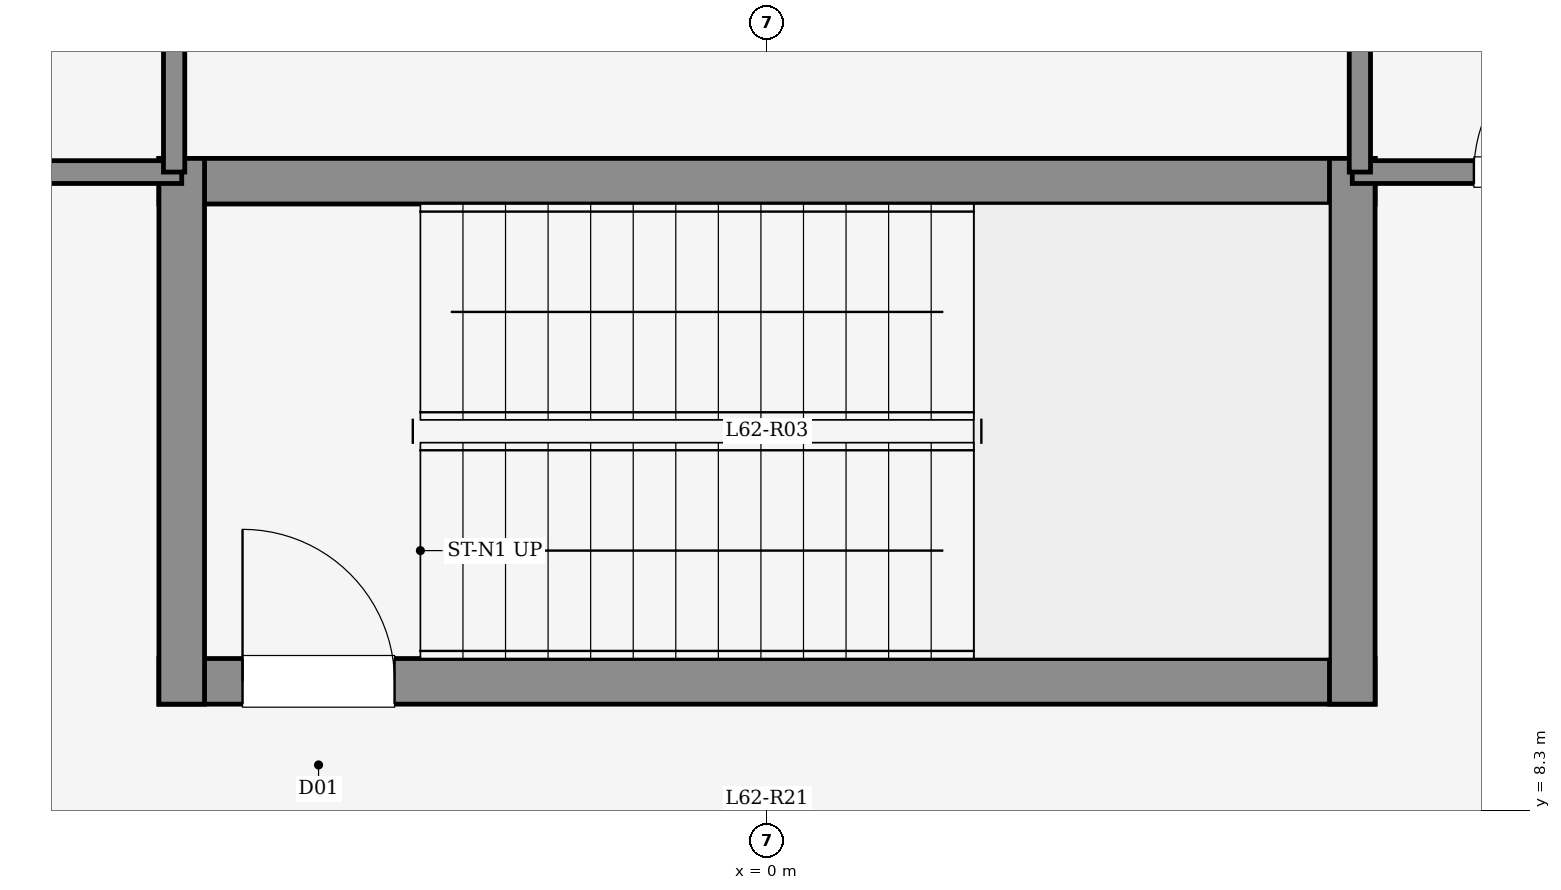
"""IFC4 building model, lengths in metres.
Left out: names, types, materials, properties, quantities, classifications, styles, units other than length and angle.
Written with IfcOpenShell. Run it as: python <this file> out.ifc"""

import sys

from ifc_helpers import new_model, si_unit, direction, frame, frame_2d, origin, place, context, subcontext, project, spatial, rectangle, extrude, element, fill, save


model = new_model("IFC4")
c1 = context("Model", 3, precision=1e-05, world=origin(), true_north=direction((0.0, 1.0)))
c2 = subcontext(c1, "Body", "Model", "MODEL_VIEW")
j1 = project(units=[si_unit("LENGTHUNIT", "METRE"), si_unit("PLANEANGLEUNIT", "RADIAN")], contexts=[c1])
p1 = place(None, origin())
s1 = spatial("IfcSite", under=j1, at=p1, CompositionType="ELEMENT")
p2 = place(p1, origin())
s2 = spatial("IfcBuilding", under=s1, at=p2, CompositionType="ELEMENT")
p3 = place(p2, frame((0.0, 0.0, 227.1)))
s3 = spatial("IfcBuildingStorey", under=s2, at=p3, CompositionType="ELEMENT", Elevation=227.1)
p4 = place(p3, frame((-4.0, 12.44, 0.0), z_axis=(0.0, 0.0, 1.0), x_axis=(1.0, 0.0, 0.0)))
e1 = element("IfcWall", 1, at=p4, inside=s3, PredefinedType="SHEAR", context=c2, shape_type="SweptSolid", body=[
    extrude(rectangle(XDim=8.0, YDim=0.3, at=frame_2d((4.0, 0.0))), origin(), (0.0, 0.0, 1.0), 4.65),
])
p5 = place(p3, frame((-4.0, 9.15, 0.0), z_axis=(0.0, 0.0, 1.0), x_axis=(1.0, 0.0, 0.0)))
e2 = element("IfcWall", 2, at=p5, inside=s3, PredefinedType="SHEAR", context=c2, shape_type="SweptSolid", body=[
    extrude(rectangle(XDim=8.0, YDim=0.3, at=frame_2d((4.0, 0.0))), origin(), (0.0, 0.0, 1.0), 4.65),
])
p6 = place(p5, frame((0.55, 0.0, 0.0)))
e3 = element("IfcOpeningElement", 3, at=p6, cuts=e2, PredefinedType="OPENING", context=c2, shape_type="SweptSolid", body=[
    extrude(rectangle(XDim=1.0, YDim=2.15, at=frame_2d((0.5, 1.075))), frame((0.0, 0.16, 0.0), z_axis=(0.0, -1.0, 0.0), x_axis=(1.0, 0.0, 0.0)), (0.0, 0.0, 1.0), 0.32),
])
for number, where, z_axis, x_axis in (
    (4, (-3.85, 9.0, 0.0), (0.0, 0.0, 1.0), (0.0, 1.0, 0.0)),
    (5, (3.85, 9.0, 0.0), (0.0, 0.0, 1.0), (0.0, 1.0, 0.0)),
):
    element("IfcWall", number, at=place(p3, frame(where, z_axis=z_axis, x_axis=x_axis)), inside=s3, PredefinedType="SHEAR", context=c2, shape_type="SweptSolid", body=[
        extrude(rectangle(XDim=3.59, YDim=0.3, at=frame_2d((1.795, 0.0))), origin(), (0.0, 0.0, 1.0), 4.65),
    ])
p7 = place(p3, frame((-18.35, 12.5, 0.0), z_axis=(0.0, 0.0, 1.0), x_axis=(1.0, 0.0, 0.0)))
e6 = element("IfcWall", 6, at=p7, inside=s3, PredefinedType="PARTITIONING", context=c2, shape_type="SweptSolid", body=[
    extrude(rectangle(XDim=14.5, YDim=0.15, at=frame_2d((7.25, 0.0))), origin(), (0.0, 0.0, 1.0), 4.35),
])
p8 = place(p7, frame((1.2, 0.0, 0.0)))
e7 = element("IfcOpeningElement", 7, at=p8, cuts=e6, PredefinedType="OPENING", context=c2, shape_type="SweptSolid", body=[
    extrude(rectangle(XDim=1.2, YDim=2.15, at=frame_2d((0.6, 1.075))), frame((0.0, 0.085, 0.0), z_axis=(0.0, -1.0, 0.0), x_axis=(1.0, 0.0, 0.0)), (0.0, 0.0, 1.0), 0.17),
])
p9 = place(p7, frame((6.932, 0.0, 0.0)))
e8 = element("IfcOpeningElement", 8, at=p9, cuts=e6, PredefinedType="OPENING", context=c2, shape_type="SweptSolid", body=[
    extrude(rectangle(XDim=1.08, YDim=2.15, at=frame_2d((0.54, 1.075))), frame((0.0, 0.085, 0.0), z_axis=(0.0, -1.0, 0.0), x_axis=(1.0, 0.0, 0.0)), (0.0, 0.0, 1.0), 0.17),
])
p10 = place(p3, frame((3.85, 12.5, 0.0), z_axis=(0.0, 0.0, 1.0), x_axis=(1.0, 0.0, 0.0)))
e9 = element("IfcWall", 9, at=p10, inside=s3, PredefinedType="PARTITIONING", context=c2, shape_type="SweptSolid", body=[
    extrude(rectangle(XDim=14.5, YDim=0.15, at=frame_2d((7.25, 0.0))), origin(), (0.0, 0.0, 1.0), 4.35),
])
p11 = place(p10, frame((0.8, 0.0, 0.0)))
e10 = element("IfcOpeningElement", 10, at=p11, cuts=e9, PredefinedType="OPENING", context=c2, shape_type="SweptSolid", body=[
    extrude(rectangle(XDim=0.95, YDim=2.15, at=frame_2d((0.475, 1.075))), frame((0.0, 0.085, 0.0), z_axis=(0.0, -1.0, 0.0), x_axis=(1.0, 0.0, 0.0)), (0.0, 0.0, 1.0), 0.17),
])
p12 = place(p10, frame((3.6, 0.0, 0.0)))
e11 = element("IfcOpeningElement", 11, at=p12, cuts=e9, PredefinedType="OPENING", context=c2, shape_type="SweptSolid", body=[
    extrude(rectangle(XDim=0.95, YDim=2.15, at=frame_2d((0.475, 1.075))), frame((0.0, 0.085, 0.0), z_axis=(0.0, -1.0, 0.0), x_axis=(1.0, 0.0, 0.0)), (0.0, 0.0, 1.0), 0.17),
])
p13 = place(p10, frame((6.55, 0.0, 0.0)))
e12 = element("IfcOpeningElement", 12, at=p13, cuts=e9, PredefinedType="OPENING", context=c2, shape_type="SweptSolid", body=[
    extrude(rectangle(XDim=1.08, YDim=2.15, at=frame_2d((0.54, 1.075))), frame((0.0, 0.085, 0.0), z_axis=(0.0, -1.0, 0.0), x_axis=(1.0, 0.0, 0.0)), (0.0, 0.0, 1.0), 0.17),
])
p14 = place(p10, frame((9.848, 0.0, 0.0)))
e13 = element("IfcOpeningElement", 13, at=p14, cuts=e9, PredefinedType="OPENING", context=c2, shape_type="SweptSolid", body=[
    extrude(rectangle(XDim=1.2, YDim=2.15, at=frame_2d((0.6, 1.075))), frame((0.0, 0.085, 0.0), z_axis=(0.0, -1.0, 0.0), x_axis=(1.0, 0.0, 0.0)), (0.0, 0.0, 1.0), 0.17),
])
for number, where, z_axis, x_axis in (
    (14, (-3.9, 12.5, 0.0), (0.0, 0.0, 1.0), (0.0, 1.0, 0.0)),
    (15, (3.9, 12.5, 0.0), (0.0, 0.0, 1.0), (0.0, 1.0, 0.0)),
):
    element("IfcWall", number, at=place(p3, frame(where, z_axis=z_axis, x_axis=x_axis)), inside=s3, PredefinedType="PARTITIONING", context=c2, shape_type="SweptSolid", body=[
        extrude(rectangle(XDim=9.88, YDim=0.14, at=frame_2d((4.94, 0.0))), origin(), (0.0, 0.0, 1.0), 4.35),
    ])
p15 = place(p6, origin())
e16 = element("IfcDoor", 16, at=p15, inside=s3, OperationType="SINGLE_SWING_LEFT", PredefinedType="DOOR", context=c2, shape_type="SweptSolid", body=[
    extrude(rectangle(XDim=1.0, YDim=2.15, at=frame_2d((0.5, 1.075))), frame((0.0, 0.025, 0.0), z_axis=(0.0, -1.0, 0.0), x_axis=(1.0, 0.0, 0.0)), (0.0, 0.0, 1.0), 0.05),
])
fill(e3, e16)
p16 = place(p11, origin())
e17 = element("IfcDoor", 17, at=p16, inside=s3, OperationType="SINGLE_SWING_RIGHT", PredefinedType="DOOR", context=c2, shape_type="SweptSolid", body=[
    extrude(rectangle(XDim=0.95, YDim=2.15, at=frame_2d((0.475, 1.075))), frame((0.0, 0.025, 0.0), z_axis=(0.0, -1.0, 0.0), x_axis=(1.0, 0.0, 0.0)), (0.0, 0.0, 1.0), 0.05),
])
fill(e10, e17)
save(model, sys.argv[1])
